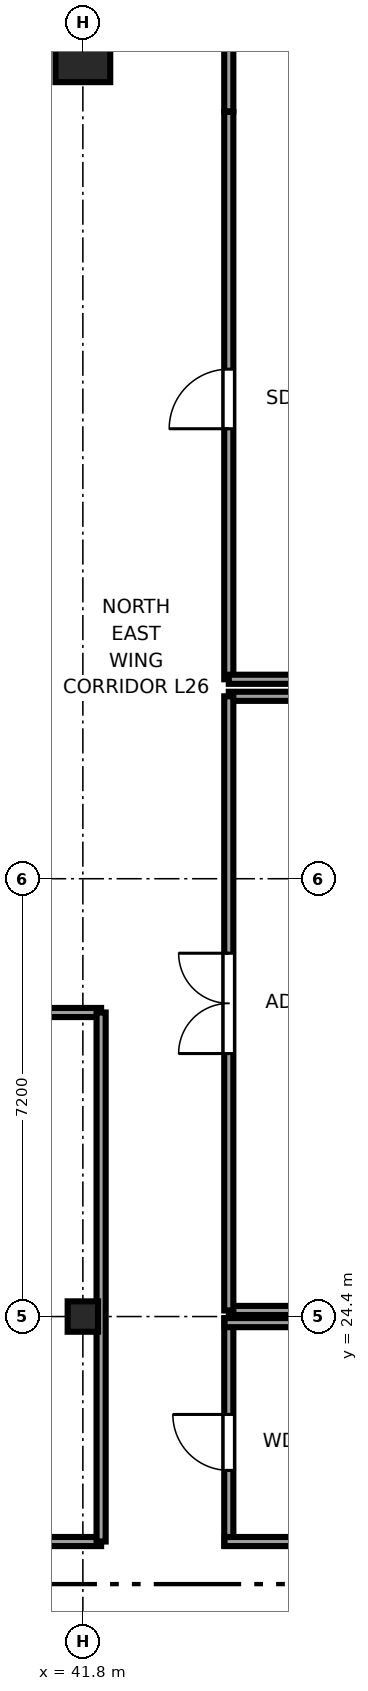
"""IFC4 building model, lengths in metres.
Left out: names, types, materials, properties, quantities, classifications, styles, units other than length and angle.
Written with IfcOpenShell. Run it as: python <this file> out.ifc"""

import sys

from ifc_helpers import new_model, si_unit, direction, frame, frame_2d, origin, origin_2d, place, context, subcontext, project, spatial, rectangle, i_section, extrude, source, transform, mapped, element, fill, save


model = new_model("IFC4")
c1 = context("Model", 3, precision=1e-05, world=origin(), true_north=direction((0.0, 1.0)))
c2 = subcontext(c1, "Body", "Model", "MODEL_VIEW")
j1 = project(units=[si_unit("LENGTHUNIT", "METRE"), si_unit("PLANEANGLEUNIT", "RADIAN")], contexts=[c1])
p1 = place(None, origin())
s1 = spatial("IfcSite", under=j1, at=p1, CompositionType="ELEMENT")
p2 = place(p1, origin())
s2 = spatial("IfcBuilding", under=s1, at=p2, CompositionType="ELEMENT")
p3 = place(p2, frame((0.0, 0.0, 104.45)))
s3 = spatial("IfcBuildingStorey", under=s2, at=p3, CompositionType="ELEMENT", Elevation=104.45)
m1 = source(origin(), c2, "Body", "SweptSolid", [
    extrude(i_section(OverallWidth=0.5, OverallDepth=0.5, WebThickness=0.022, FlangeThickness=0.034, at=origin_2d()), origin(), (0.0, 0.0, 1.0), 3.55),
])
p4 = place(p3, frame((41.8, 24.4, 0.0), z_axis=(0.0, 0.0, 1.0), x_axis=(1.0, 0.0, 0.0)))
e1 = element("IfcColumn", 1, at=p4, inside=s3, PredefinedType="COLUMN", context=c2, shape_type="MappedRepresentation", body=[
    mapped(m1, transform((0.0, 0.0, 0.0), x_axis=(1.0, 0.0, 0.0), y_axis=(0.0, 1.0, 0.0), z_axis=(0.0, 0.0, 1.0), scale=1.0)),
])
m2 = source(origin(), c2, "Body", "SweptSolid", [
    extrude(rectangle(XDim=0.9, YDim=0.9, at=origin_2d()), origin(), (0.0, 0.0, 1.0), 3.55),
])
p5 = place(p3, frame((41.8, 45.15, 0.0), z_axis=(0.0, 0.0, 1.0), x_axis=(1.0, 0.0, 0.0)))
e2 = element("IfcColumn", 2, at=p5, inside=s3, PredefinedType="COLUMN", context=c2, shape_type="MappedRepresentation", body=[
    mapped(m2, transform((0.0, 0.0, 0.0), x_axis=(1.0, 0.0, 0.0), y_axis=(0.0, 1.0, 0.0), z_axis=(0.0, 0.0, 1.0), scale=1.0)),
])
p6 = place(p3, frame((44.2, 20.63, 0.0), z_axis=(0.0, 0.0, 1.0), x_axis=(0.0, 1.0, 0.0)))
e3 = element("IfcWall", 3, at=p6, inside=s3, PredefinedType="PARTITIONING", context=c2, shape_type="SweptSolid", body=[
    extrude(rectangle(XDim=3.74, YDim=0.15, at=frame_2d((1.87, 0.0))), origin(), (0.0, 0.0, 1.0), 3.37),
])
p7 = place(p6, frame((1.24, 0.0, 0.0)))
e4 = element("IfcOpeningElement", 4, at=p7, cuts=e3, PredefinedType="OPENING", context=c2, shape_type="SweptSolid", body=[
    extrude(rectangle(XDim=0.92, YDim=2.01, at=frame_2d((0.46, 1.005))), frame((0.0, 0.085, 0.0), z_axis=(0.0, -1.0, 0.0), x_axis=(1.0, 0.0, 0.0)), (0.0, 0.0, 1.0), 0.17),
])
p8 = place(p3, frame((44.13, 20.7, 0.0), z_axis=(0.0, 0.0, 1.0), x_axis=(1.0, 0.0, 0.0)))
e5 = element("IfcWall", 5, at=p8, inside=s3, PredefinedType="PARTITIONING", context=c2, shape_type="SweptSolid", body=[
    extrude(rectangle(XDim=4.54, YDim=0.15, at=frame_2d((2.27, 0.0))), origin(), (0.0, 0.0, 1.0), 3.37),
])
p9 = place(p3, frame((44.13, 24.3, 0.0), z_axis=(0.0, 0.0, 1.0), x_axis=(1.0, 0.0, 0.0)))
e6 = element("IfcWall", 6, at=p9, inside=s3, PredefinedType="PARTITIONING", context=c2, shape_type="SweptSolid", body=[
    extrude(rectangle(XDim=4.54, YDim=0.15, at=frame_2d((2.27, 0.0))), origin(), (0.0, 0.0, 1.0), 2.748),
])
p10 = place(p3, frame((44.2, 24.5, 0.0), z_axis=(0.0, 0.0, 1.0), x_axis=(1.0, 0.0, 0.0)))
e7 = element("IfcWall", 7, at=p10, inside=s3, PredefinedType="PARTITIONING", context=c2, shape_type="SweptSolid", body=[
    extrude(rectangle(XDim=12.395, YDim=0.15, at=frame_2d((6.198, 0.0))), origin(), (0.0, 0.0, 1.0), 2.748),
])
p11 = place(p3, frame((44.2, 34.6, 0.0), z_axis=(0.0, 0.0, 1.0), x_axis=(1.0, 0.0, 0.0)))
e8 = element("IfcWall", 8, at=p11, inside=s3, PredefinedType="PARTITIONING", context=c2, shape_type="SweptSolid", body=[
    extrude(rectangle(XDim=12.395, YDim=0.15, at=frame_2d((6.198, 0.0))), origin(), (0.0, 0.0, 1.0), 3.37),
])
p12 = place(p3, frame((44.2, 24.5, 0.0), z_axis=(0.0, 0.0, 1.0), x_axis=(0.0, 1.0, 0.0)))
e9 = element("IfcWall", 9, at=p12, inside=s3, PredefinedType="PARTITIONING", context=c2, shape_type="SweptSolid", body=[
    extrude(rectangle(XDim=10.1, YDim=0.15, at=frame_2d((5.05, 0.0))), origin(), (0.0, 0.0, 1.0), 3.37),
])
p13 = place(p12, frame((4.225, 0.0, 0.0)))
e10 = element("IfcOpeningElement", 10, at=p13, cuts=e9, PredefinedType="OPENING", context=c2, shape_type="SweptSolid", body=[
    extrude(rectangle(XDim=1.65, YDim=2.15, at=frame_2d((0.825, 1.075))), frame((0.0, 0.085, 0.0), z_axis=(0.0, -1.0, 0.0), x_axis=(1.0, 0.0, 0.0)), (0.0, 0.0, 1.0), 0.17),
])
p14 = place(p3, frame((44.2, 34.88, 0.0), z_axis=(0.0, 0.0, 1.0), x_axis=(0.0, 1.0, 0.0)))
e11 = element("IfcWall", 11, at=p14, inside=s3, PredefinedType="PARTITIONING", context=c2, shape_type="SweptSolid", body=[
    extrude(rectangle(XDim=9.33, YDim=0.15, at=frame_2d((4.665, 0.0))), origin(), (0.0, 0.0, 1.0), 3.37),
])
p15 = place(p14, frame((4.12, 0.0, 0.0)))
e12 = element("IfcOpeningElement", 12, at=p15, cuts=e11, PredefinedType="OPENING", context=c2, shape_type="SweptSolid", body=[
    extrude(rectangle(XDim=0.98, YDim=2.12, at=frame_2d((0.49, 1.06))), frame((0.0, 0.085, 0.0), z_axis=(0.0, -1.0, 0.0), x_axis=(1.0, 0.0, 0.0)), (0.0, 0.0, 1.0), 0.17),
])
p16 = place(p3, frame((44.2, 34.88, 0.0), z_axis=(0.0, 0.0, 1.0), x_axis=(1.0, 0.0, 0.0)))
e13 = element("IfcWall", 13, at=p16, inside=s3, PredefinedType="PARTITIONING", context=c2, shape_type="SweptSolid", body=[
    extrude(rectangle(XDim=10.03, YDim=0.15, at=frame_2d((5.015, 0.0))), origin(), (0.0, 0.0, 1.0), 3.37),
])
p17 = place(p3, frame((44.2, 44.22, 0.0), z_axis=(0.0, 0.0, 1.0), x_axis=(0.0, 1.0, 0.0)))
e14 = element("IfcWall", 14, at=p17, inside=s3, PredefinedType="PARTITIONING", context=c2, shape_type="SweptSolid", body=[
    extrude(rectangle(XDim=1.375, YDim=0.15, at=frame_2d((0.688, 0.0))), origin(), (0.0, 0.0, 1.0), 3.37),
])
p18 = place(p3, frame((34.6, 20.7, 0.0), z_axis=(0.0, 0.0, 1.0), x_axis=(1.0, 0.0, 0.0)))
e15 = element("IfcWall", 15, at=p18, inside=s3, PredefinedType="PARTITIONING", context=c2, shape_type="SweptSolid", body=[
    extrude(rectangle(XDim=7.5, YDim=0.15, at=frame_2d((3.75, 0.0))), origin(), (0.0, 0.0, 1.0), 3.37),
])
p19 = place(p18, frame((2.925, 0.0, 0.0)))
e16 = element("IfcOpeningElement", 16, at=p19, cuts=e15, PredefinedType="OPENING", context=c2, shape_type="SweptSolid", body=[
    extrude(rectangle(XDim=1.65, YDim=2.15, at=frame_2d((0.825, 1.075))), frame((0.0, 0.085, 0.0), z_axis=(0.0, -1.0, 0.0), x_axis=(1.0, 0.0, 0.0)), (0.0, 0.0, 1.0), 0.17),
])
p20 = place(p3, frame((34.6, 29.4, 0.0), z_axis=(0.0, 0.0, 1.0), x_axis=(1.0, 0.0, 0.0)))
e17 = element("IfcWall", 17, at=p20, inside=s3, PredefinedType="PARTITIONING", context=c2, shape_type="SweptSolid", body=[
    extrude(rectangle(XDim=7.5, YDim=0.15, at=frame_2d((3.75, 0.0))), origin(), (0.0, 0.0, 1.0), 3.37),
])
p21 = place(p3, frame((42.1, 20.7, 0.0), z_axis=(0.0, 0.0, 1.0), x_axis=(0.0, 1.0, 0.0)))
e18 = element("IfcWall", 18, at=p21, inside=s3, PredefinedType="PARTITIONING", context=c2, shape_type="SweptSolid", body=[
    extrude(rectangle(XDim=8.7, YDim=0.15, at=frame_2d((4.35, 0.0))), origin(), (0.0, 0.0, 1.0), 2.16),
])
m3 = source(origin(), c2, "Body", "SweptSolid", [
    extrude(rectangle(XDim=0.92, YDim=2.01, at=frame_2d((0.46, 1.005))), frame((0.0, 0.025, 0.0), z_axis=(0.0, -1.0, 0.0), x_axis=(1.0, 0.0, 0.0)), (0.0, 0.0, 1.0), 0.05),
])
p22 = place(p7, origin())
e19 = element("IfcDoor", 19, at=p22, inside=s3, OperationType="SINGLE_SWING_RIGHT", PredefinedType="DOOR", context=c2, shape_type="MappedRepresentation", body=[
    mapped(m3, transform((0.0, 0.0, 0.0), x_axis=(1.0, 0.0, 0.0), y_axis=(0.0, 1.0, 0.0), z_axis=(0.0, 0.0, 1.0), scale=1.0)),
])
fill(e4, e19)
m4 = source(origin(), c2, "Body", "SweptSolid", [
    extrude(rectangle(XDim=1.65, YDim=2.15, at=frame_2d((0.825, 1.075))), frame((0.0, 0.025, 0.0), z_axis=(0.0, -1.0, 0.0), x_axis=(1.0, 0.0, 0.0)), (0.0, 0.0, 1.0), 0.05),
])
p23 = place(p13, origin())
e20 = element("IfcDoor", 20, at=p23, inside=s3, OperationType="DOUBLE_DOOR_SINGLE_SWING", PredefinedType="DOOR", context=c2, shape_type="MappedRepresentation", body=[
    mapped(m4, transform((0.0, 0.0, 0.0), x_axis=(1.0, 0.0, 0.0), y_axis=(0.0, 1.0, 0.0), z_axis=(0.0, 0.0, 1.0), scale=1.0)),
])
fill(e10, e20)
m5 = source(origin(), c2, "Body", "SweptSolid", [
    extrude(rectangle(XDim=0.98, YDim=2.12, at=frame_2d((0.49, 1.06))), frame((0.0, 0.025, 0.0), z_axis=(0.0, -1.0, 0.0), x_axis=(1.0, 0.0, 0.0)), (0.0, 0.0, 1.0), 0.05),
])
p24 = place(p15, origin())
e21 = element("IfcDoor", 21, at=p24, inside=s3, OperationType="SINGLE_SWING_LEFT", PredefinedType="DOOR", context=c2, shape_type="MappedRepresentation", body=[
    mapped(m5, transform((0.0, 0.0, 0.0), x_axis=(1.0, 0.0, 0.0), y_axis=(0.0, 1.0, 0.0), z_axis=(0.0, 0.0, 1.0), scale=1.0)),
])
fill(e12, e21)
save(model, sys.argv[1])
